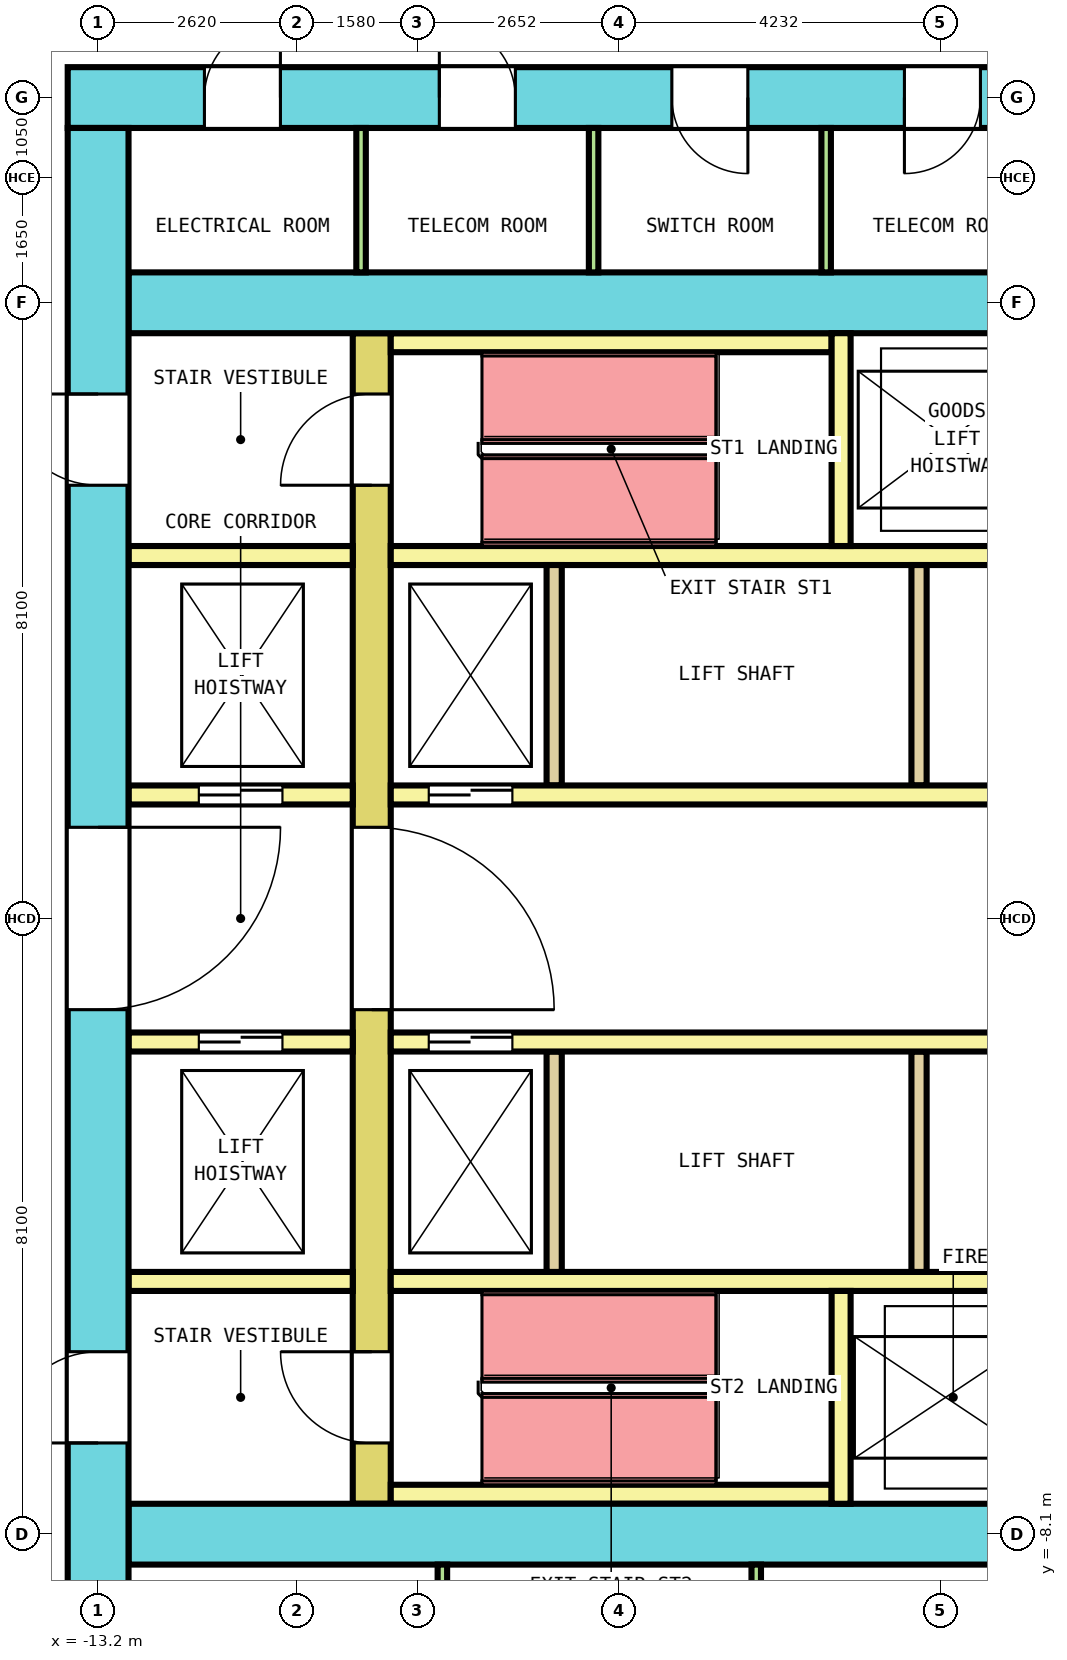
"""IFC4 building model, lengths in metres.
Left out: names, types, materials, properties, quantities, classifications, styles, units other than length and angle.
Written with IfcOpenShell. Run it as: python <this file> out.ifc"""

import sys

from ifc_helpers import new_model, si_unit, direction, frame, frame_2d, origin, place, context, subcontext, project, spatial, rectangle, extrude, element, fill, save


model = new_model("IFC4")
c1 = context("Model", 3, precision=1e-05, world=origin(), true_north=direction((0.0, 1.0)))
c2 = subcontext(c1, "Body", "Model", "MODEL_VIEW")
j1 = project(units=[si_unit("LENGTHUNIT", "METRE"), si_unit("PLANEANGLEUNIT", "RADIAN")], contexts=[c1])
p1 = place(None, origin())
s1 = spatial("IfcSite", under=j1, at=p1, CompositionType="ELEMENT")
p2 = place(p1, origin())
s2 = spatial("IfcBuilding", under=s1, at=p2, CompositionType="ELEMENT")
p3 = place(p2, frame((0.0, 0.0, 89.6)))
s3 = spatial("IfcBuildingStorey", under=s2, at=p3, CompositionType="ELEMENT", Elevation=89.6)
p4 = place(p3, frame((-13.6, 10.8, 0.0), z_axis=(0.0, 0.0, 1.0), x_axis=(1.0, 0.0, 0.0)))
e1 = element("IfcWall", 1, at=p4, inside=s3, PredefinedType="SHEAR", context=c2, shape_type="SweptSolid", body=[
    extrude(rectangle(XDim=27.2, YDim=0.8, at=frame_2d((13.6, 0.0))), origin(), (0.0, 0.0, 1.0), 4.1),
])
p5 = place(p4, frame((1.798, 0.0, 0.0)))
e2 = element("IfcOpeningElement", 2, at=p5, cuts=e1, PredefinedType="OPENING", context=c2, shape_type="SweptSolid", body=[
    extrude(rectangle(XDim=1.0, YDim=2.1, at=frame_2d((0.5, 1.05))), frame((0.0, 0.41, 0.0), z_axis=(0.0, -1.0, 0.0), x_axis=(1.0, 0.0, 0.0)), (0.0, 0.0, 1.0), 0.82),
])
p6 = place(p4, frame((4.889, 0.0, 0.0)))
e3 = element("IfcOpeningElement", 3, at=p6, cuts=e1, PredefinedType="OPENING", context=c2, shape_type="SweptSolid", body=[
    extrude(rectangle(XDim=1.0, YDim=2.1, at=frame_2d((0.5, 1.05))), frame((0.0, 0.41, 0.0), z_axis=(0.0, -1.0, 0.0), x_axis=(1.0, 0.0, 0.0)), (0.0, 0.0, 1.0), 0.82),
])
p7 = place(p4, frame((7.948, 0.0, 0.0)))
e4 = element("IfcOpeningElement", 4, at=p7, cuts=e1, PredefinedType="OPENING", context=c2, shape_type="SweptSolid", body=[
    extrude(rectangle(XDim=1.0, YDim=2.1, at=frame_2d((0.5, 1.05))), frame((0.0, 0.41, 0.0), z_axis=(0.0, -1.0, 0.0), x_axis=(1.0, 0.0, 0.0)), (0.0, 0.0, 1.0), 0.82),
])
p8 = place(p4, frame((11.008, 0.0, 0.0)))
e5 = element("IfcOpeningElement", 5, at=p8, cuts=e1, PredefinedType="OPENING", context=c2, shape_type="SweptSolid", body=[
    extrude(rectangle(XDim=1.0, YDim=2.1, at=frame_2d((0.5, 1.05))), frame((0.0, 0.41, 0.0), z_axis=(0.0, -1.0, 0.0), x_axis=(1.0, 0.0, 0.0)), (0.0, 0.0, 1.0), 0.82),
])
p9 = place(p4, frame((21.212, 0.0, 0.0)))
e6 = element("IfcOpeningElement", 6, at=p9, cuts=e1, PredefinedType="OPENING", context=c2, shape_type="SweptSolid", body=[
    extrude(rectangle(XDim=1.0, YDim=2.1, at=frame_2d((0.5, 1.05))), frame((0.0, 0.41, 0.0), z_axis=(0.0, -1.0, 0.0), x_axis=(1.0, 0.0, 0.0)), (0.0, 0.0, 1.0), 0.82),
])
p10 = place(p4, frame((14.525, 0.0, 0.0)))
e7 = element("IfcOpeningElement", 7, at=p10, cuts=e1, PredefinedType="OPENING", context=c2, shape_type="SweptSolid", body=[
    extrude(rectangle(XDim=1.4, YDim=2.1, at=frame_2d((0.7, 1.05))), frame((0.0, 0.41, 0.0), z_axis=(0.0, -1.0, 0.0), x_axis=(1.0, 0.0, 0.0)), (0.0, 0.0, 1.0), 0.82),
])
p11 = place(p3, frame((-13.2, -10.4, 0.0), z_axis=(0.0, 0.0, 1.0), x_axis=(0.0, 1.0, 0.0)))
e8 = element("IfcWall", 8, at=p11, inside=s3, PredefinedType="SHEAR", context=c2, shape_type="SweptSolid", body=[
    extrude(rectangle(XDim=20.8, YDim=0.8, at=frame_2d((10.4, 0.0))), origin(), (0.0, 0.0, 1.0), 4.1),
])
p12 = place(p11, frame((9.2, 0.0, 0.0)))
e9 = element("IfcOpeningElement", 9, at=p12, cuts=e8, PredefinedType="OPENING", context=c2, shape_type="SweptSolid", body=[
    extrude(rectangle(XDim=2.4, YDim=2.1, at=frame_2d((1.2, 1.05))), frame((0.0, 0.41, 0.0), z_axis=(0.0, -1.0, 0.0), x_axis=(1.0, 0.0, 0.0)), (0.0, 0.0, 1.0), 0.82),
])
p13 = place(p11, frame((16.1, 0.0, 0.0)))
e10 = element("IfcOpeningElement", 10, at=p13, cuts=e8, PredefinedType="OPENING", context=c2, shape_type="SweptSolid", body=[
    extrude(rectangle(XDim=1.2, YDim=2.1, at=frame_2d((0.6, 1.05))), frame((0.0, 0.41, 0.0), z_axis=(0.0, -1.0, 0.0), x_axis=(1.0, 0.0, 0.0)), (0.0, 0.0, 1.0), 0.82),
])
p14 = place(p11, frame((3.5, 0.0, 0.0)))
e11 = element("IfcOpeningElement", 11, at=p14, cuts=e8, PredefinedType="OPENING", context=c2, shape_type="SweptSolid", body=[
    extrude(rectangle(XDim=1.2, YDim=2.1, at=frame_2d((0.6, 1.05))), frame((0.0, 0.41, 0.0), z_axis=(0.0, -1.0, 0.0), x_axis=(1.0, 0.0, 0.0)), (0.0, 0.0, 1.0), 0.82),
])
p15 = place(p3, frame((-12.8, 8.1, 0.0), z_axis=(0.0, 0.0, 1.0), x_axis=(1.0, 0.0, 0.0)))
e12 = element("IfcWall", 12, at=p15, inside=s3, PredefinedType="SHEAR", context=c2, shape_type="SweptSolid", body=[
    extrude(rectangle(XDim=25.6, YDim=0.8, at=frame_2d((12.8, 0.0))), origin(), (0.0, 0.0, 1.0), 4.1),
])
p16 = place(p15, frame((13.725, 0.0, 0.0)))
e13 = element("IfcOpeningElement", 13, at=p16, cuts=e12, PredefinedType="OPENING", context=c2, shape_type="SweptSolid", body=[
    extrude(rectangle(XDim=1.4, YDim=2.1, at=frame_2d((0.7, 1.05))), frame((0.0, 0.41, 0.0), z_axis=(0.0, -1.0, 0.0), x_axis=(1.0, 0.0, 0.0)), (0.0, 0.0, 1.0), 0.82),
])
p17 = place(p3, frame((-12.8, -8.1, 0.0), z_axis=(0.0, 0.0, 1.0), x_axis=(1.0, 0.0, 0.0)))
e14 = element("IfcWall", 14, at=p17, inside=s3, PredefinedType="SHEAR", context=c2, shape_type="SweptSolid", body=[
    extrude(rectangle(XDim=25.6, YDim=0.8, at=frame_2d((12.8, 0.0))), origin(), (0.0, 0.0, 1.0), 4.1),
])
p18 = place(p17, frame((14.35, 0.0, 0.0)))
e15 = element("IfcOpeningElement", 15, at=p18, cuts=e14, PredefinedType="OPENING", context=c2, shape_type="SweptSolid", body=[
    extrude(rectangle(XDim=1.2, YDim=2.1, at=frame_2d((0.6, 1.05))), frame((0.0, 0.41, 0.0), z_axis=(0.0, -1.0, 0.0), x_axis=(1.0, 0.0, 0.0)), (0.0, 0.0, 1.0), 0.82),
])
p19 = place(p3, frame((-9.6, -7.7, 0.0), z_axis=(0.0, 0.0, 1.0), x_axis=(0.0, 1.0, 0.0)))
e16 = element("IfcWall", 16, at=p19, inside=s3, PredefinedType="SHEAR", context=c2, shape_type="SweptSolid", body=[
    extrude(rectangle(XDim=15.4, YDim=0.5, at=frame_2d((7.7, 0.0))), origin(), (0.0, 0.0, 1.0), 4.1),
])
p20 = place(p19, frame((6.5, 0.0, 0.0)))
e17 = element("IfcOpeningElement", 17, at=p20, cuts=e16, PredefinedType="OPENING", context=c2, shape_type="SweptSolid", body=[
    extrude(rectangle(XDim=2.4, YDim=2.1, at=frame_2d((1.2, 1.05))), frame((0.0, 0.26, 0.0), z_axis=(0.0, -1.0, 0.0), x_axis=(1.0, 0.0, 0.0)), (0.0, 0.0, 1.0), 0.52),
])
p21 = place(p19, frame((13.4, 0.0, 0.0)))
e18 = element("IfcOpeningElement", 18, at=p21, cuts=e16, PredefinedType="OPENING", context=c2, shape_type="SweptSolid", body=[
    extrude(rectangle(XDim=1.2, YDim=2.1, at=frame_2d((0.6, 1.05))), frame((0.0, 0.26, 0.0), z_axis=(0.0, -1.0, 0.0), x_axis=(1.0, 0.0, 0.0)), (0.0, 0.0, 1.0), 0.52),
])
p22 = place(p19, frame((0.8, 0.0, 0.0)))
e19 = element("IfcOpeningElement", 19, at=p22, cuts=e16, PredefinedType="OPENING", context=c2, shape_type="SweptSolid", body=[
    extrude(rectangle(XDim=1.2, YDim=2.1, at=frame_2d((0.6, 1.05))), frame((0.0, 0.26, 0.0), z_axis=(0.0, -1.0, 0.0), x_axis=(1.0, 0.0, 0.0)), (0.0, 0.0, 1.0), 0.52),
])
p23 = place(p3, frame((-12.8, 1.625, 0.0), z_axis=(0.0, 0.0, 1.0), x_axis=(1.0, 0.0, 0.0)))
e20 = element("IfcWall", 20, at=p23, inside=s3, PredefinedType="SOLIDWALL", context=c2, shape_type="SweptSolid", body=[
    extrude(rectangle(XDim=2.95, YDim=0.25, at=frame_2d((1.475, 0.0))), origin(), (0.0, 0.0, 1.0), 4.1),
])
p24 = place(p23, frame((0.925, 0.0, 0.0)))
e21 = element("IfcOpeningElement", 21, at=p24, cuts=e20, PredefinedType="OPENING", context=c2, shape_type="SweptSolid", body=[
    extrude(rectangle(XDim=1.1, YDim=2.1, at=frame_2d((0.55, 1.05))), frame((0.0, 0.135, 0.0), z_axis=(0.0, -1.0, 0.0), x_axis=(1.0, 0.0, 0.0)), (0.0, 0.0, 1.0), 0.27),
])
p25 = place(p3, frame((-9.35, 1.625, 0.0), z_axis=(0.0, 0.0, 1.0), x_axis=(1.0, 0.0, 0.0)))
e22 = element("IfcWall", 22, at=p25, inside=s3, PredefinedType="SOLIDWALL", context=c2, shape_type="SweptSolid", body=[
    extrude(rectangle(XDim=18.7, YDim=0.25, at=frame_2d((9.35, 0.0))), origin(), (0.0, 0.0, 1.0), 4.1),
])
p26 = place(p25, frame((0.5, 0.0, 0.0)))
e23 = element("IfcOpeningElement", 23, at=p26, cuts=e22, PredefinedType="OPENING", context=c2, shape_type="SweptSolid", body=[
    extrude(rectangle(XDim=1.1, YDim=2.1, at=frame_2d((0.55, 1.05))), frame((0.0, 0.135, 0.0), z_axis=(0.0, -1.0, 0.0), x_axis=(1.0, 0.0, 0.0)), (0.0, 0.0, 1.0), 0.27),
])
p27 = place(p25, frame((17.1, 0.0, 0.0)))
e24 = element("IfcOpeningElement", 24, at=p27, cuts=e22, PredefinedType="OPENING", context=c2, shape_type="SweptSolid", body=[
    extrude(rectangle(XDim=1.1, YDim=2.1, at=frame_2d((0.55, 1.05))), frame((0.0, 0.135, 0.0), z_axis=(0.0, -1.0, 0.0), x_axis=(1.0, 0.0, 0.0)), (0.0, 0.0, 1.0), 0.27),
])
p28 = place(p3, frame((-12.8, 4.775, 0.0), z_axis=(0.0, 0.0, 1.0), x_axis=(1.0, 0.0, 0.0)))
e25 = element("IfcWall", 25, at=p28, inside=s3, PredefinedType="SOLIDWALL", context=c2, shape_type="SweptSolid", body=[
    extrude(rectangle(XDim=2.95, YDim=0.25, at=frame_2d((1.475, 0.0))), origin(), (0.0, 0.0, 1.0), 4.1),
])
p29 = place(p3, frame((-9.35, 4.775, 0.0), z_axis=(0.0, 0.0, 1.0), x_axis=(1.0, 0.0, 0.0)))
e26 = element("IfcWall", 26, at=p29, inside=s3, PredefinedType="SOLIDWALL", context=c2, shape_type="SweptSolid", body=[
    extrude(rectangle(XDim=18.7, YDim=0.25, at=frame_2d((9.35, 0.0))), origin(), (0.0, 0.0, 1.0), 4.1),
])
for number, where, z_axis, x_axis in (
    (27, (-7.2, 1.75, 0.0), (0.0, 0.0, 1.0), (0.0, 1.0, 0.0)),
    (28, (-2.4, 1.75, 0.0), (0.0, 0.0, 1.0), (0.0, 1.0, 0.0)),
):
    element("IfcWall", number, at=place(p3, frame(where, z_axis=z_axis, x_axis=x_axis)), inside=s3, PredefinedType="SOLIDWALL", context=c2, shape_type="SweptSolid", body=[
        extrude(rectangle(XDim=2.9, YDim=0.2, at=frame_2d((1.45, 0.0))), origin(), (0.0, 0.0, 1.0), 4.1),
    ])
p30 = place(p3, frame((-12.8, -1.625, 0.0), z_axis=(0.0, 0.0, 1.0), x_axis=(1.0, 0.0, 0.0)))
e29 = element("IfcWall", 29, at=p30, inside=s3, PredefinedType="SOLIDWALL", context=c2, shape_type="SweptSolid", body=[
    extrude(rectangle(XDim=2.95, YDim=0.25, at=frame_2d((1.475, 0.0))), origin(), (0.0, 0.0, 1.0), 4.1),
])
p31 = place(p30, frame((0.925, 0.0, 0.0)))
e30 = element("IfcOpeningElement", 30, at=p31, cuts=e29, PredefinedType="OPENING", context=c2, shape_type="SweptSolid", body=[
    extrude(rectangle(XDim=1.1, YDim=2.1, at=frame_2d((0.55, 1.05))), frame((0.0, 0.135, 0.0), z_axis=(0.0, -1.0, 0.0), x_axis=(1.0, 0.0, 0.0)), (0.0, 0.0, 1.0), 0.27),
])
p32 = place(p3, frame((-9.35, -1.625, 0.0), z_axis=(0.0, 0.0, 1.0), x_axis=(1.0, 0.0, 0.0)))
e31 = element("IfcWall", 31, at=p32, inside=s3, PredefinedType="SOLIDWALL", context=c2, shape_type="SweptSolid", body=[
    extrude(rectangle(XDim=18.7, YDim=0.25, at=frame_2d((9.35, 0.0))), origin(), (0.0, 0.0, 1.0), 4.1),
])
p33 = place(p32, frame((0.5, 0.0, 0.0)))
e32 = element("IfcOpeningElement", 32, at=p33, cuts=e31, PredefinedType="OPENING", context=c2, shape_type="SweptSolid", body=[
    extrude(rectangle(XDim=1.1, YDim=2.1, at=frame_2d((0.55, 1.05))), frame((0.0, 0.135, 0.0), z_axis=(0.0, -1.0, 0.0), x_axis=(1.0, 0.0, 0.0)), (0.0, 0.0, 1.0), 0.27),
])
p34 = place(p32, frame((17.1, 0.0, 0.0)))
e33 = element("IfcOpeningElement", 33, at=p34, cuts=e31, PredefinedType="OPENING", context=c2, shape_type="SweptSolid", body=[
    extrude(rectangle(XDim=1.1, YDim=2.1, at=frame_2d((0.55, 1.05))), frame((0.0, 0.135, 0.0), z_axis=(0.0, -1.0, 0.0), x_axis=(1.0, 0.0, 0.0)), (0.0, 0.0, 1.0), 0.27),
])
p35 = place(p3, frame((-12.8, -4.775, 0.0), z_axis=(0.0, 0.0, 1.0), x_axis=(1.0, 0.0, 0.0)))
e34 = element("IfcWall", 34, at=p35, inside=s3, PredefinedType="SOLIDWALL", context=c2, shape_type="SweptSolid", body=[
    extrude(rectangle(XDim=2.95, YDim=0.25, at=frame_2d((1.475, 0.0))), origin(), (0.0, 0.0, 1.0), 4.1),
])
p36 = place(p3, frame((-9.35, -4.775, 0.0), z_axis=(0.0, 0.0, 1.0), x_axis=(1.0, 0.0, 0.0)))
e35 = element("IfcWall", 35, at=p36, inside=s3, PredefinedType="SOLIDWALL", context=c2, shape_type="SweptSolid", body=[
    extrude(rectangle(XDim=18.7, YDim=0.25, at=frame_2d((9.35, 0.0))), origin(), (0.0, 0.0, 1.0), 4.1),
])
for number, where, z_axis, x_axis in (
    (36, (-7.2, -4.65, 0.0), (0.0, 0.0, 1.0), (0.0, 1.0, 0.0)),
    (37, (-2.4, -4.65, 0.0), (0.0, 0.0, 1.0), (0.0, 1.0, 0.0)),
):
    element("IfcWall", number, at=place(p3, frame(where, z_axis=z_axis, x_axis=x_axis)), inside=s3, PredefinedType="SOLIDWALL", context=c2, shape_type="SweptSolid", body=[
        extrude(rectangle(XDim=2.9, YDim=0.2, at=frame_2d((1.45, 0.0))), origin(), (0.0, 0.0, 1.0), 4.1),
    ])
p37 = place(p3, frame((-9.35, 7.575, 0.0), z_axis=(0.0, 0.0, 1.0), x_axis=(1.0, 0.0, 0.0)))
e38 = element("IfcWall", 38, at=p37, inside=s3, PredefinedType="SOLIDWALL", context=c2, shape_type="SweptSolid", body=[
    extrude(rectangle(XDim=5.8, YDim=0.25, at=frame_2d((2.9, 0.0))), origin(), (0.0, 0.0, 1.0), 4.1),
])
p38 = place(p3, frame((-3.425, 4.9, 0.0), z_axis=(0.0, 0.0, 1.0), x_axis=(0.0, 1.0, 0.0)))
e39 = element("IfcWall", 39, at=p38, inside=s3, PredefinedType="SOLIDWALL", context=c2, shape_type="SweptSolid", body=[
    extrude(rectangle(XDim=2.8, YDim=0.25, at=frame_2d((1.4, 0.0))), origin(), (0.0, 0.0, 1.0), 4.1),
])
p39 = place(p3, frame((-9.35, -7.575, 0.0), z_axis=(0.0, 0.0, 1.0), x_axis=(1.0, 0.0, 0.0)))
e40 = element("IfcWall", 40, at=p39, inside=s3, PredefinedType="SOLIDWALL", context=c2, shape_type="SweptSolid", body=[
    extrude(rectangle(XDim=5.8, YDim=0.25, at=frame_2d((2.9, 0.0))), origin(), (0.0, 0.0, 1.0), 4.1),
])
p40 = place(p3, frame((-3.425, -7.7, 0.0), z_axis=(0.0, 0.0, 1.0), x_axis=(0.0, 1.0, 0.0)))
e41 = element("IfcWall", 41, at=p40, inside=s3, PredefinedType="SOLIDWALL", context=c2, shape_type="SweptSolid", body=[
    extrude(rectangle(XDim=2.8, YDim=0.25, at=frame_2d((1.4, 0.0))), origin(), (0.0, 0.0, 1.0), 4.1),
])
for number, where, z_axis, x_axis in (
    (42, (-9.74, 8.5, 0.0), (0.0, 0.0, 1.0), (0.0, 1.0, 0.0)),
    (43, (-6.681, 8.5, 0.0), (0.0, 0.0, 1.0), (0.0, 1.0, 0.0)),
    (44, (-3.622, 8.5, 0.0), (0.0, 0.0, 1.0), (0.0, 1.0, 0.0)),
    (45, (-8.671, -10.4, 0.0), (0.0, 0.0, 1.0), (0.0, 1.0, 0.0)),
    (46, (-4.542, -10.4, 0.0), (0.0, 0.0, 1.0), (0.0, 1.0, 0.0)),
):
    element("IfcWall", number, at=place(p3, frame(where, z_axis=z_axis, x_axis=x_axis)), inside=s3, PredefinedType="PARTITIONING", context=c2, shape_type="SweptSolid", body=[
        extrude(rectangle(XDim=1.9, YDim=0.125, at=frame_2d((0.95, 0.0))), origin(), (0.0, 0.0, 1.0), 4.1),
    ])
p41 = place(p24, origin())
e47 = element("IfcDoor", 47, at=p41, inside=s3, OperationType="DOUBLE_DOOR_SLIDING", PredefinedType="DOOR", context=c2, shape_type="SweptSolid", body=[
    extrude(rectangle(XDim=1.1, YDim=2.1, at=frame_2d((0.55, 1.05))), frame((0.0, 0.075, 0.0), z_axis=(0.0, -1.0, 0.0), x_axis=(1.0, 0.0, 0.0)), (0.0, 0.0, 1.0), 0.15),
])
fill(e21, e47)
p42 = place(p26, origin())
e48 = element("IfcDoor", 48, at=p42, inside=s3, OperationType="DOUBLE_DOOR_SLIDING", PredefinedType="DOOR", context=c2, shape_type="SweptSolid", body=[
    extrude(rectangle(XDim=1.1, YDim=2.1, at=frame_2d((0.55, 1.05))), frame((0.0, 0.075, 0.0), z_axis=(0.0, -1.0, 0.0), x_axis=(1.0, 0.0, 0.0)), (0.0, 0.0, 1.0), 0.15),
])
fill(e23, e48)
p43 = place(p31, origin())
e49 = element("IfcDoor", 49, at=p43, inside=s3, OperationType="DOUBLE_DOOR_SLIDING", PredefinedType="DOOR", context=c2, shape_type="SweptSolid", body=[
    extrude(rectangle(XDim=1.1, YDim=2.1, at=frame_2d((0.55, 1.05))), frame((0.0, 0.075, 0.0), z_axis=(0.0, -1.0, 0.0), x_axis=(1.0, 0.0, 0.0)), (0.0, 0.0, 1.0), 0.15),
])
fill(e30, e49)
p44 = place(p33, origin())
e50 = element("IfcDoor", 50, at=p44, inside=s3, OperationType="DOUBLE_DOOR_SLIDING", PredefinedType="DOOR", context=c2, shape_type="SweptSolid", body=[
    extrude(rectangle(XDim=1.1, YDim=2.1, at=frame_2d((0.55, 1.05))), frame((0.0, 0.075, 0.0), z_axis=(0.0, -1.0, 0.0), x_axis=(1.0, 0.0, 0.0)), (0.0, 0.0, 1.0), 0.15),
])
fill(e32, e50)
p45 = place(p20, origin())
e51 = element("IfcDoor", 51, at=p45, inside=s3, OperationType="DOUBLE_DOOR_SINGLE_SWING", PredefinedType="DOOR", context=c2, shape_type="SweptSolid", body=[
    extrude(rectangle(XDim=2.4, YDim=2.1, at=frame_2d((1.2, 1.05))), frame((0.0, 0.2, 0.0), z_axis=(0.0, -1.0, 0.0), x_axis=(1.0, 0.0, 0.0)), (0.0, 0.0, 1.0), 0.4),
])
fill(e17, e51)
p46 = place(p12, origin())
e52 = element("IfcDoor", 52, at=p46, inside=s3, OperationType="DOUBLE_DOOR_SINGLE_SWING", PredefinedType="DOOR", context=c2, shape_type="SweptSolid", body=[
    extrude(rectangle(XDim=2.4, YDim=2.1, at=frame_2d((1.2, 1.05))), frame((0.0, 0.3, 0.0), z_axis=(0.0, -1.0, 0.0), x_axis=(1.0, 0.0, 0.0)), (0.0, 0.0, 1.0), 0.6),
])
fill(e9, e52)
p47 = place(p21, origin())
e53 = element("IfcDoor", 53, at=p47, inside=s3, OperationType="SINGLE_SWING_LEFT", PredefinedType="DOOR", context=c2, shape_type="SweptSolid", body=[
    extrude(rectangle(XDim=1.2, YDim=2.1, at=frame_2d((0.6, 1.05))), frame((0.0, 0.2, 0.0), z_axis=(0.0, -1.0, 0.0), x_axis=(1.0, 0.0, 0.0)), (0.0, 0.0, 1.0), 0.4),
])
fill(e18, e53)
p48 = place(p13, origin())
e54 = element("IfcDoor", 54, at=p48, inside=s3, OperationType="SINGLE_SWING_RIGHT", PredefinedType="DOOR", context=c2, shape_type="SweptSolid", body=[
    extrude(rectangle(XDim=1.2, YDim=2.1, at=frame_2d((0.6, 1.05))), frame((0.0, 0.3, 0.0), z_axis=(0.0, -1.0, 0.0), x_axis=(1.0, 0.0, 0.0)), (0.0, 0.0, 1.0), 0.6),
])
fill(e10, e54)
p49 = place(p22, origin())
e55 = element("IfcDoor", 55, at=p49, inside=s3, OperationType="SINGLE_SWING_LEFT", PredefinedType="DOOR", context=c2, shape_type="SweptSolid", body=[
    extrude(rectangle(XDim=1.2, YDim=2.1, at=frame_2d((0.6, 1.05))), frame((0.0, 0.2, 0.0), z_axis=(0.0, -1.0, 0.0), x_axis=(1.0, 0.0, 0.0)), (0.0, 0.0, 1.0), 0.4),
])
fill(e19, e55)
p50 = place(p14, origin())
e56 = element("IfcDoor", 56, at=p50, inside=s3, OperationType="SINGLE_SWING_RIGHT", PredefinedType="DOOR", context=c2, shape_type="SweptSolid", body=[
    extrude(rectangle(XDim=1.2, YDim=2.1, at=frame_2d((0.6, 1.05))), frame((0.0, 0.3, 0.0), z_axis=(0.0, -1.0, 0.0), x_axis=(1.0, 0.0, 0.0)), (0.0, 0.0, 1.0), 0.6),
])
fill(e11, e56)
p51 = place(p5, origin())
e57 = element("IfcDoor", 57, at=p51, inside=s3, OperationType="SINGLE_SWING_RIGHT", PredefinedType="DOOR", context=c2, shape_type="SweptSolid", body=[
    extrude(rectangle(XDim=1.0, YDim=2.1, at=frame_2d((0.5, 1.05))), frame((0.0, 0.3, 0.0), z_axis=(0.0, -1.0, 0.0), x_axis=(1.0, 0.0, 0.0)), (0.0, 0.0, 1.0), 0.6),
])
fill(e2, e57)
p52 = place(p6, origin())
e58 = element("IfcDoor", 58, at=p52, inside=s3, OperationType="SINGLE_SWING_LEFT", PredefinedType="DOOR", context=c2, shape_type="SweptSolid", body=[
    extrude(rectangle(XDim=1.0, YDim=2.1, at=frame_2d((0.5, 1.05))), frame((0.0, 0.3, 0.0), z_axis=(0.0, -1.0, 0.0), x_axis=(1.0, 0.0, 0.0)), (0.0, 0.0, 1.0), 0.6),
])
fill(e3, e58)
p53 = place(p7, origin())
e59 = element("IfcDoor", 59, at=p53, inside=s3, OperationType="SINGLE_SWING_RIGHT", PredefinedType="DOOR", context=c2, shape_type="SweptSolid", body=[
    extrude(rectangle(XDim=1.0, YDim=2.1, at=frame_2d((0.5, 1.05))), frame((0.0, 0.3, 0.0), z_axis=(0.0, -1.0, 0.0), x_axis=(1.0, 0.0, 0.0)), (0.0, 0.0, 1.0), 0.6),
])
fill(e4, e59)
p54 = place(p8, origin())
e60 = element("IfcDoor", 60, at=p54, inside=s3, OperationType="SINGLE_SWING_LEFT", PredefinedType="DOOR", context=c2, shape_type="SweptSolid", body=[
    extrude(rectangle(XDim=1.0, YDim=2.1, at=frame_2d((0.5, 1.05))), frame((0.0, 0.3, 0.0), z_axis=(0.0, -1.0, 0.0), x_axis=(1.0, 0.0, 0.0)), (0.0, 0.0, 1.0), 0.6),
])
fill(e5, e60)
save(model, sys.argv[1])
